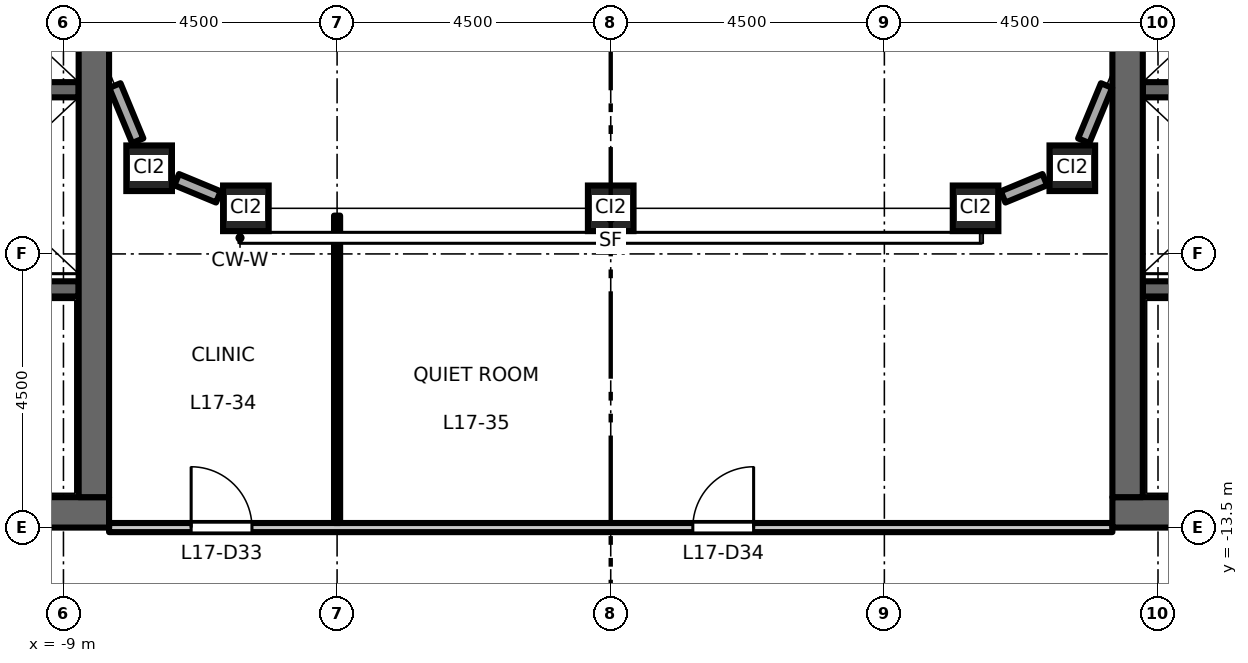
"""IFC4 building model, lengths in metres.
Left out: names, types, materials, properties, quantities, classifications, styles, units other than length and angle.
Written with IfcOpenShell. Run it as: python <this file> out.ifc"""

import sys

from ifc_helpers import new_model, si_unit, direction, frame, frame_2d, origin, origin_2d, place, context, subcontext, project, spatial, rectangle, hollow_rectangle, extrude, element, fill, save


model = new_model("IFC4")
c1 = context("Model", 3, precision=1e-05, world=origin(), true_north=direction((0.0, 1.0)))
c2 = subcontext(c1, "Body", "Model", "MODEL_VIEW")
j1 = project(units=[si_unit("LENGTHUNIT", "METRE"), si_unit("PLANEANGLEUNIT", "RADIAN")], contexts=[c1])
p1 = place(None, origin())
s1 = spatial("IfcSite", under=j1, at=p1, CompositionType="ELEMENT")
p2 = place(p1, origin())
s2 = spatial("IfcBuilding", under=s1, at=p2, CompositionType="ELEMENT")
p3 = place(p2, frame((0.0, 0.0, 80.7)))
s3 = spatial("IfcBuildingStorey", under=s2, at=p3, CompositionType="ELEMENT", Elevation=80.7)
for number, where, z_axis, x_axis in (
    (1, (-7.591, -7.591, 0.0), (0.0, 0.0, 1.0), (1.0, 0.0, 0.0)),
    (2, (-6.0, -8.25, 0.0), (0.0, 0.0, 1.0), (1.0, 0.0, 0.0)),
    (3, (0.0, -8.25, 0.0), (0.0, 0.0, 1.0), (1.0, 0.0, 0.0)),
    (4, (6.0, -8.25, 0.0), (0.0, 0.0, 1.0), (1.0, 0.0, 0.0)),
    (5, (7.591, -7.591, 0.0), (0.0, 0.0, 1.0), (1.0, 0.0, 0.0)),
):
    element("IfcColumn", number, at=place(p3, frame(where, z_axis=z_axis, x_axis=x_axis)), inside=s3, PredefinedType="COLUMN", context=c2, shape_type="SweptSolid", body=[
        extrude(hollow_rectangle(XDim=0.75, YDim=0.75, WallThickness=0.045, at=origin_2d()), origin(), (0.0, 0.0, 1.0), 4.5),
    ])
p4 = place(p3, frame((-8.75, -6.3, 0.0), z_axis=(0.0, 0.0, 1.0), x_axis=(-1.0, 0.0, 0.0)))
e6 = element("IfcWall", 6, at=p4, inside=s3, PredefinedType="SHEAR", context=c2, shape_type="SweptSolid", body=[
    extrude(rectangle(XDim=3.1, YDim=0.25, at=frame_2d((1.55, 0.0))), origin(), (0.0, 0.0, 1.0), 4.35),
])
p5 = place(p3, frame((-8.75, -9.575, 0.0), z_axis=(0.0, 0.0, 1.0), x_axis=(-1.0, 0.0, 0.0)))
e7 = element("IfcWall", 7, at=p5, inside=s3, PredefinedType="SHEAR", context=c2, shape_type="SweptSolid", body=[
    extrude(rectangle(XDim=8.0, YDim=0.25, at=frame_2d((4.0, 0.0))), origin(), (0.0, 0.0, 1.0), 4.35),
])
p6 = place(p5, frame((6.65, 0.0, 0.0)))
e8 = element("IfcOpeningElement", 8, at=p6, cuts=e7, PredefinedType="OPENING", context=c2, shape_type="SweptSolid", body=[
    extrude(rectangle(XDim=1.1, YDim=2.1, at=frame_2d((0.55, 1.05))), frame((0.0, 0.135, 0.0), z_axis=(0.0, -1.0, 0.0), x_axis=(1.0, 0.0, 0.0)), (0.0, 0.0, 1.0), 0.27),
])
p7 = place(p3, frame((-8.25, -13.25, 0.0), z_axis=(0.0, 0.0, 1.0), x_axis=(-1.0, 0.0, 0.0)))
e9 = element("IfcWall", 9, at=p7, inside=s3, PredefinedType="SHEAR", context=c2, shape_type="SweptSolid", body=[
    extrude(rectangle(XDim=13.5, YDim=0.5, at=frame_2d((6.75, 0.0))), origin(), (0.0, 0.0, 1.0), 4.35),
])
p8 = place(p3, frame((-8.5, -13.0, 0.0), z_axis=(0.0, 0.0, 1.0), x_axis=(0.0, 1.0, 0.0)))
e10 = element("IfcWall", 10, at=p8, inside=s3, PredefinedType="SHEAR", context=c2, shape_type="SweptSolid", body=[
    extrude(rectangle(XDim=26.0, YDim=0.5, at=frame_2d((13.0, 0.0))), origin(), (0.0, 0.0, 1.0), 4.35),
])
p9 = place(p3, frame((8.75, -6.3, 0.0), z_axis=(0.0, 0.0, 1.0), x_axis=(1.0, 0.0, 0.0)))
e11 = element("IfcWall", 11, at=p9, inside=s3, PredefinedType="SHEAR", context=c2, shape_type="SweptSolid", body=[
    extrude(rectangle(XDim=3.1, YDim=0.25, at=frame_2d((1.55, 0.0))), origin(), (0.0, 0.0, 1.0), 4.35),
])
p10 = place(p3, frame((8.75, -9.575, 0.0), z_axis=(0.0, 0.0, 1.0), x_axis=(1.0, 0.0, 0.0)))
e12 = element("IfcWall", 12, at=p10, inside=s3, PredefinedType="SHEAR", context=c2, shape_type="SweptSolid", body=[
    extrude(rectangle(XDim=8.0, YDim=0.25, at=frame_2d((4.0, 0.0))), origin(), (0.0, 0.0, 1.0), 4.35),
])
p11 = place(p10, frame((6.65, 0.0, 0.0)))
e13 = element("IfcOpeningElement", 13, at=p11, cuts=e12, PredefinedType="OPENING", context=c2, shape_type="SweptSolid", body=[
    extrude(rectangle(XDim=1.1, YDim=2.1, at=frame_2d((0.55, 1.05))), frame((0.0, 0.135, 0.0), z_axis=(0.0, -1.0, 0.0), x_axis=(1.0, 0.0, 0.0)), (0.0, 0.0, 1.0), 0.27),
])
p12 = place(p3, frame((8.25, -13.25, 0.0), z_axis=(0.0, 0.0, 1.0), x_axis=(1.0, 0.0, 0.0)))
e14 = element("IfcWall", 14, at=p12, inside=s3, PredefinedType="SHEAR", context=c2, shape_type="SweptSolid", body=[
    extrude(rectangle(XDim=13.5, YDim=0.5, at=frame_2d((6.75, 0.0))), origin(), (0.0, 0.0, 1.0), 4.35),
])
p13 = place(p3, frame((8.5, -13.0, 0.0), z_axis=(0.0, 0.0, 1.0), x_axis=(0.0, 1.0, 0.0)))
e15 = element("IfcWall", 15, at=p13, inside=s3, PredefinedType="SHEAR", context=c2, shape_type="SweptSolid", body=[
    extrude(rectangle(XDim=26.0, YDim=0.5, at=frame_2d((13.0, 0.0))), origin(), (0.0, 0.0, 1.0), 4.35),
])
p14 = place(p3, frame((6.453, -8.062, 0.0), z_axis=(0.0, 0.0, 1.0), x_axis=(0.923940677943, 0.382535780864, 0.0)))
e16 = element("IfcWall", 16, at=p14, inside=s3, PredefinedType="STANDARD", context=c2, shape_type="SweptSolid", body=[
    extrude(rectangle(XDim=0.742, YDim=0.2, at=frame_2d((0.371, 0.0))), origin(), (0.0, 0.0, 1.0), 3.73),
])
for number, where, z_axis, x_axis in (
    (17, (7.779, -7.138, 0.0), (0.0, 0.0, 1.0), (0.383, 0.924, 0.0)),
    (18, (-8.154, -6.231, 0.0), (0.0, 0.0, 1.0), (0.383, -0.924, 0.0)),
):
    element("IfcWall", number, at=place(p3, frame(where, z_axis=z_axis, x_axis=x_axis)), inside=s3, PredefinedType="STANDARD", context=c2, shape_type="SweptSolid", body=[
        extrude(rectangle(XDim=0.982, YDim=0.2, at=frame_2d((0.491, 0.0))), origin(), (0.0, 0.0, 1.0), 3.73),
    ])
p15 = place(p3, frame((-7.138, -7.779, 0.0), z_axis=(0.0, 0.0, 1.0), x_axis=(0.923940677943, -0.382535780864, 0.0)))
e19 = element("IfcWall", 19, at=p15, inside=s3, PredefinedType="STANDARD", context=c2, shape_type="SweptSolid", body=[
    extrude(rectangle(XDim=0.742, YDim=0.2, at=frame_2d((0.371, 0.0))), origin(), (0.0, 0.0, 1.0), 3.73),
])
p16 = place(p3, frame((-8.25, -13.5, 0.0), z_axis=(0.0, 0.0, 1.0), x_axis=(1.0, 0.0, 0.0)))
e20 = element("IfcWall", 20, at=p16, inside=s3, PredefinedType="PARTITIONING", context=c2, shape_type="SweptSolid", body=[
    extrude(rectangle(XDim=16.5, YDim=0.15, at=frame_2d((8.25, 0.0))), origin(), (0.0, 0.0, 1.0), 3.85),
])
p17 = place(p16, frame((1.35, 0.0, 0.0)))
e21 = element("IfcOpeningElement", 21, at=p17, cuts=e20, PredefinedType="OPENING", context=c2, shape_type="SweptSolid", body=[
    extrude(rectangle(XDim=1.0, YDim=2.1, at=frame_2d((0.5, 1.05))), frame((0.0, 0.085, 0.0), z_axis=(0.0, -1.0, 0.0), x_axis=(1.0, 0.0, 0.0)), (0.0, 0.0, 1.0), 0.17),
])
p18 = place(p16, frame((9.6, 0.0, 0.0)))
e22 = element("IfcOpeningElement", 22, at=p18, cuts=e20, PredefinedType="OPENING", context=c2, shape_type="SweptSolid", body=[
    extrude(rectangle(XDim=1.0, YDim=2.1, at=frame_2d((0.5, 1.05))), frame((0.0, 0.085, 0.0), z_axis=(0.0, -1.0, 0.0), x_axis=(1.0, 0.0, 0.0)), (0.0, 0.0, 1.0), 0.17),
])
p19 = place(p3, frame((-4.5, -13.425, 0.0), z_axis=(0.0, 0.0, 1.0), x_axis=(0.0, 1.0, 0.0)))
e23 = element("IfcWall", 23, at=p19, inside=s3, PredefinedType="PARTITIONING", context=c2, shape_type="SweptSolid", body=[
    extrude(rectangle(XDim=5.055, YDim=0.1, at=frame_2d((2.527, 0.0))), origin(), (0.0, 0.0, 1.0), 3.35),
])
p20 = place(p17, origin())
e24 = element("IfcDoor", 24, at=p20, inside=s3, OperationType="SINGLE_SWING_LEFT", PredefinedType="DOOR", context=c2, shape_type="SweptSolid", body=[
    extrude(rectangle(XDim=1.0, YDim=2.1, at=frame_2d((0.5, 1.05))), frame((0.0, 0.025, 0.0), z_axis=(0.0, -1.0, 0.0), x_axis=(1.0, 0.0, 0.0)), (0.0, 0.0, 1.0), 0.05),
])
fill(e21, e24)
p21 = place(p18, origin())
e25 = element("IfcDoor", 25, at=p21, inside=s3, OperationType="SINGLE_SWING_RIGHT", PredefinedType="DOOR", context=c2, shape_type="SweptSolid", body=[
    extrude(rectangle(XDim=1.0, YDim=2.1, at=frame_2d((0.5, 1.05))), frame((0.0, 0.025, 0.0), z_axis=(0.0, -1.0, 0.0), x_axis=(1.0, 0.0, 0.0)), (0.0, 0.0, 1.0), 0.05),
])
fill(e22, e25)
save(model, sys.argv[1])
